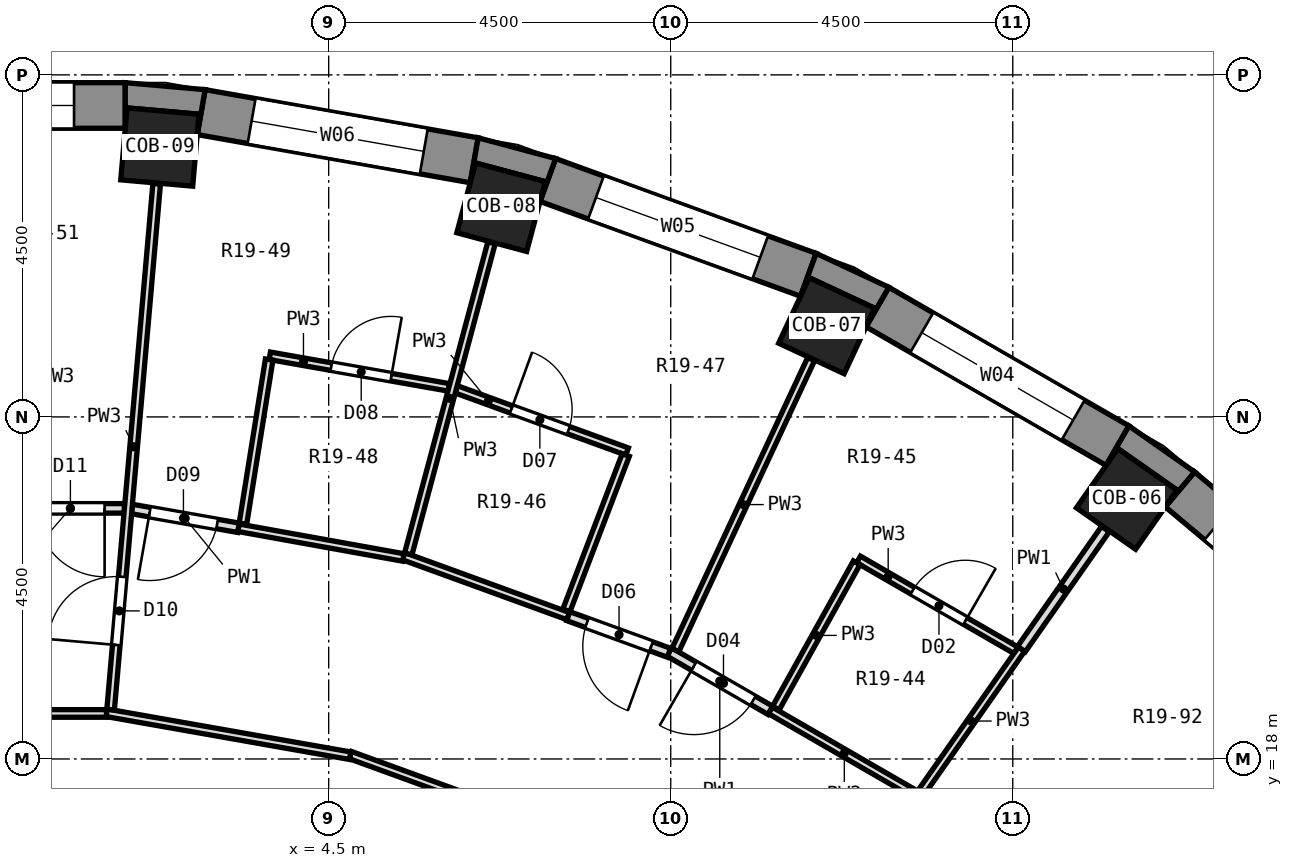
"""IFC4 building model, lengths in metres.
Left out: names, types, materials, properties, quantities, classifications, styles, units other than length and angle.
Written with IfcOpenShell. Run it as: python <this file> out.ifc"""

import sys

from ifc_helpers import new_model, si_unit, direction, frame, frame_2d, origin, origin_2d, place, context, subcontext, project, spatial, polyline, rectangle, outline, extrude, element, fill, save


model = new_model("IFC4")
c1 = context("Model", 3, precision=1e-05, world=origin(), true_north=direction((0.0, 1.0)))
c2 = subcontext(c1, "Body", "Model", "MODEL_VIEW")
j1 = project(units=[si_unit("LENGTHUNIT", "METRE"), si_unit("PLANEANGLEUNIT", "RADIAN")], contexts=[c1])
p1 = place(None, origin())
s1 = spatial("IfcSite", under=j1, at=p1, CompositionType="ELEMENT")
p2 = place(p1, origin())
s2 = spatial("IfcBuilding", under=s1, at=p2, CompositionType="ELEMENT")
p3 = place(p2, frame((0.0, 0.0, 111.7)))
s3 = spatial("IfcBuildingStorey", under=s2, at=p3, CompositionType="ELEMENT", Elevation=111.7)
for number, where, z_axis, x_axis in (
    (1, (14.999, 21.421, 0.0), (0.0, 0.0, 1.0), (0.574, 0.819, 0.0)),
    (2, (11.052, 23.7, 0.0), (0.0, 0.0, 1.0), (0.423, 0.906, 0.0)),
    (3, (6.768, 25.259, 0.0), (0.0, 0.0, 1.0), (0.259, 0.966, 0.0)),
    (4, (2.279, 26.051, 0.0), (0.0, 0.0, 1.0), (0.087, 0.996, 0.0)),
):
    element("IfcColumn", number, at=place(p3, frame(where, z_axis=z_axis, x_axis=x_axis)), inside=s3, PredefinedType="COLUMN", context=c2, shape_type="SweptSolid", body=[
        extrude(rectangle(XDim=0.95, YDim=0.95, at=origin_2d()), origin(), (0.0, 0.0, 1.0), 3.3),
    ])
p4 = place(p3, frame((18.494, 19.202, 0.0), z_axis=(0.0, 0.0, 1.0), x_axis=(-0.766055462616, 0.642774476932, 0.0)))
e5 = element("IfcWall", 5, at=p4, inside=s3, PredefinedType="SOLIDWALL", context=c2, shape_type="SweptSolid", body=[
    extrude(rectangle(XDim=3.648, YDim=0.6, at=frame_2d((1.824, 0.0))), origin(), (0.0, 0.0, 1.0), 2.8),
])
p5 = place(p4, frame((0.674, 0.0, 0.9)))
e6 = element("IfcOpeningElement", 6, at=p5, cuts=e5, PredefinedType="OPENING", context=c2, shape_type="SweptSolid", body=[
    extrude(rectangle(XDim=2.3, YDim=1.8, at=frame_2d((1.15, 0.9))), frame((0.0, 0.312, 0.0), z_axis=(0.0, -1.0, 0.0), x_axis=(1.0, 0.0, 0.0)), (0.0, 0.0, 1.0), 0.624),
])
p6 = place(p3, frame((14.878, 22.122, 0.0), z_axis=(0.0, 0.0, 1.0), x_axis=(-0.866051847062, 0.499954196102, 0.0)))
e7 = element("IfcWall", 7, at=p6, inside=s3, PredefinedType="SOLIDWALL", context=c2, shape_type="SweptSolid", body=[
    extrude(rectangle(XDim=3.648, YDim=0.6, at=frame_2d((1.824, 0.0))), origin(), (0.0, 0.0, 1.0), 2.8),
])
p7 = place(p6, frame((0.674, 0.0, 0.9)))
e8 = element("IfcOpeningElement", 8, at=p7, cuts=e7, PredefinedType="OPENING", context=c2, shape_type="SweptSolid", body=[
    extrude(rectangle(XDim=2.3, YDim=1.8, at=frame_2d((1.15, 0.9))), frame((0.0, 0.312, 0.0), z_axis=(0.0, -1.0, 0.0), x_axis=(1.0, 0.0, 0.0)), (0.0, 0.0, 1.0), 0.624),
])
p8 = place(p3, frame((10.811, 24.369, 0.0), z_axis=(0.0, 0.0, 1.0), x_axis=(-0.939703505393, 0.341990236633, 0.0)))
e9 = element("IfcWall", 9, at=p8, inside=s3, PredefinedType="SOLIDWALL", context=c2, shape_type="SweptSolid", body=[
    extrude(rectangle(XDim=3.648, YDim=0.6, at=frame_2d((1.824, 0.0))), origin(), (0.0, 0.0, 1.0), 2.8),
])
p9 = place(p8, frame((0.674, 0.0, 0.9)))
e10 = element("IfcOpeningElement", 10, at=p9, cuts=e9, PredefinedType="OPENING", context=c2, shape_type="SweptSolid", body=[
    extrude(rectangle(XDim=2.3, YDim=1.8, at=frame_2d((1.15, 0.9))), frame((0.0, 0.312, 0.0), z_axis=(0.0, -1.0, 0.0), x_axis=(1.0, 0.0, 0.0)), (0.0, 0.0, 1.0), 0.624),
])
p10 = place(p3, frame((6.415, 25.876, 0.0), z_axis=(0.0, 0.0, 1.0), x_axis=(-0.984803764455, 0.173670796382, 0.0)))
e11 = element("IfcWall", 11, at=p10, inside=s3, PredefinedType="SOLIDWALL", context=c2, shape_type="SweptSolid", body=[
    extrude(rectangle(XDim=3.648, YDim=0.6, at=frame_2d((1.824, 0.0))), origin(), (0.0, 0.0, 1.0), 2.8),
])
p11 = place(p10, frame((0.674, 0.0, 0.9)))
e12 = element("IfcOpeningElement", 12, at=p11, cuts=e11, PredefinedType="OPENING", context=c2, shape_type="SweptSolid", body=[
    extrude(rectangle(XDim=2.3, YDim=1.8, at=frame_2d((1.15, 0.9))), frame((0.0, 0.312, 0.0), z_axis=(0.0, -1.0, 0.0), x_axis=(1.0, 0.0, 0.0)), (0.0, 0.0, 1.0), 0.624),
])
p12 = place(p3, frame((1.824, 26.597, 0.0), z_axis=(0.0, 0.0, 1.0), x_axis=(-1.0, 0.0, 0.0)))
e13 = element("IfcWall", 13, at=p12, inside=s3, PredefinedType="SOLIDWALL", context=c2, shape_type="SweptSolid", body=[
    extrude(rectangle(XDim=3.648, YDim=0.6, at=frame_2d((1.824, 0.0))), origin(), (0.0, 0.0, 1.0), 2.8),
])
p13 = place(p12, frame((0.674, 0.0, 0.9)))
e14 = element("IfcOpeningElement", 14, at=p13, cuts=e13, PredefinedType="OPENING", context=c2, shape_type="SweptSolid", body=[
    extrude(rectangle(XDim=2.3, YDim=1.8, at=frame_2d((1.15, 0.9))), frame((0.0, 0.312, 0.0), z_axis=(0.0, -1.0, 0.0), x_axis=(1.0, 0.0, 0.0)), (0.0, 0.0, 1.0), 0.624),
])
p14 = place(p3, origin())
e15 = element("IfcWall", 15, at=p14, inside=s3, PredefinedType="SOLIDWALL", context=c2, shape_type="SweptSolid", body=[
    extrude(outline(polyline([(15.028, 22.382), (14.728, 21.862), (14.882, 22.083), (15.661, 21.538), (15.506, 21.317), (15.892, 21.777), (15.028, 22.382)])), origin(), (0.0, 0.0, 1.0), 2.8),
])
p15 = place(p3, origin())
e16 = element("IfcWall", 16, at=p15, inside=s3, PredefinedType="SOLIDWALL", context=c2, shape_type="SweptSolid", body=[
    extrude(outline(polyline([(10.913, 24.651), (10.708, 24.087), (10.822, 24.331), (11.683, 23.93), (11.569, 23.686), (11.869, 24.206), (10.913, 24.651)])), origin(), (0.0, 0.0, 1.0), 2.8),
])
p16 = place(p3, origin())
e17 = element("IfcWall", 17, at=p16, inside=s3, PredefinedType="SOLIDWALL", context=c2, shape_type="SweptSolid", body=[
    extrude(outline(polyline([(7.486, 25.899), (6.467, 26.172), (6.363, 25.581), (6.432, 25.841), (7.35, 25.595), (7.28, 25.335), (7.486, 25.899)])), origin(), (0.0, 0.0, 1.0), 2.8),
])
p17 = place(p3, origin())
e18 = element("IfcWall", 18, at=p17, inside=s3, PredefinedType="SOLIDWALL", context=c2, shape_type="SweptSolid", body=[
    extrude(outline(polyline([(2.875, 26.805), (1.824, 26.897), (1.824, 26.297), (1.847, 26.565), (2.794, 26.482), (2.77, 26.215), (2.875, 26.805)])), origin(), (0.0, 0.0, 1.0), 2.8),
])
p18 = place(p3, frame((10.31, 18.64, 0.0), z_axis=(0.0, 0.0, 1.0), x_axis=(0.865856719536, -0.500292055938, 0.0)))
e19 = element("IfcWall", 19, at=p18, inside=s3, PredefinedType="PARTITIONING", context=c2, shape_type="SweptSolid", body=[
    extrude(rectangle(XDim=2.251, YDim=0.1, at=frame_2d((1.125, 0.0))), origin(), (0.0, 0.0, 1.0), 2.8),
])
p19 = place(p3, frame((8.98, 19.408, 0.0), z_axis=(0.0, 0.0, 1.0), x_axis=(0.866013487713, -0.500020638674, 0.0)))
e20 = element("IfcWall", 20, at=p19, inside=s3, PredefinedType="PARTITIONING", context=c2, shape_type="SweptSolid", body=[
    extrude(rectangle(XDim=1.536, YDim=0.125, at=frame_2d((0.768, 0.0))), origin(), (0.0, 0.0, 1.0), 2.8),
])
p20 = place(p19, frame((0.375, 0.0, 0.0)))
e21 = element("IfcOpeningElement", 21, at=p20, cuts=e20, PredefinedType="OPENING", context=c2, shape_type="SweptSolid", body=[
    extrude(rectangle(XDim=0.9, YDim=2.1, at=frame_2d((0.45, 1.05))), frame((0.0, 0.074, 0.0), z_axis=(0.0, -1.0, 0.0), x_axis=(1.0, 0.0, 0.0)), (0.0, 0.0, 1.0), 0.149),
])
p21 = place(p3, frame((11.471, 20.625, 0.0), z_axis=(0.0, 0.0, 1.0), x_axis=(0.866161784063, -0.499763707994, 0.0)))
e22 = element("IfcWall", 22, at=p21, inside=s3, PredefinedType="PARTITIONING", context=c2, shape_type="SweptSolid", body=[
    extrude(rectangle(XDim=2.391, YDim=0.1, at=frame_2d((1.195, 0.0))), origin(), (0.0, 0.0, 1.0), 2.8),
])
p22 = place(p21, frame((0.822, 0.0, 0.0)))
e23 = element("IfcOpeningElement", 23, at=p22, cuts=e22, PredefinedType="OPENING", context=c2, shape_type="SweptSolid", body=[
    extrude(rectangle(XDim=0.8, YDim=2.1, at=frame_2d((0.4, 1.05))), frame((0.0, 0.062, 0.0), z_axis=(0.0, -1.0, 0.0), x_axis=(1.0, 0.0, 0.0)), (0.0, 0.0, 1.0), 0.124),
])
p23 = place(p3, frame((4.784, 18.051, 0.0), z_axis=(0.0, 0.0, 1.0), x_axis=(0.939697033511, -0.34200801922, 0.0)))
e24 = element("IfcWall", 24, at=p23, inside=s3, PredefinedType="PARTITIONING", context=c2, shape_type="SweptSolid", body=[
    extrude(rectangle(XDim=3.255, YDim=0.1, at=frame_2d((1.627, 0.0))), origin(), (0.0, 0.0, 1.0), 2.8),
])
p24 = place(p3, frame((5.485, 20.667, 0.0), z_axis=(0.0, 0.0, 1.0), x_axis=(0.939734670151, -0.34190459154, 0.0)))
e25 = element("IfcWall", 25, at=p24, inside=s3, PredefinedType="PARTITIONING", context=c2, shape_type="SweptSolid", body=[
    extrude(rectangle(XDim=2.306, YDim=0.1, at=frame_2d((1.153, 0.0))), origin(), (0.0, 0.0, 1.0), 2.8),
])
p25 = place(p3, frame((7.652, 19.879, 0.0), z_axis=(0.0, 0.0, 1.0), x_axis=(0.939813657692, -0.341687413896, 0.0)))
e26 = element("IfcWall", 26, at=p25, inside=s3, PredefinedType="PARTITIONING", context=c2, shape_type="SweptSolid", body=[
    extrude(rectangle(XDim=1.409, YDim=0.125, at=frame_2d((0.705, 0.0))), origin(), (0.0, 0.0, 1.0), 2.8),
])
p26 = place(p25, frame((0.261, 0.0, 0.0)))
e27 = element("IfcOpeningElement", 27, at=p26, cuts=e26, PredefinedType="OPENING", context=c2, shape_type="SweptSolid", body=[
    extrude(rectangle(XDim=0.9, YDim=2.1, at=frame_2d((0.45, 1.05))), frame((0.0, 0.074, 0.0), z_axis=(0.0, -1.0, 0.0), x_axis=(1.0, 0.0, 0.0)), (0.0, 0.0, 1.0), 0.149),
])
p27 = place(p3, frame((6.178, 22.863, 0.0), z_axis=(0.0, 0.0, 1.0), x_axis=(0.93973977618, -0.341890557146, 0.0)))
e28 = element("IfcWall", 28, at=p27, inside=s3, PredefinedType="PARTITIONING", context=c2, shape_type="SweptSolid", body=[
    extrude(rectangle(XDim=2.392, YDim=0.1, at=frame_2d((1.196, 0.0))), origin(), (0.0, 0.0, 1.0), 2.8),
])
p28 = place(p27, frame((0.771, 0.0, 0.0)))
e29 = element("IfcOpeningElement", 29, at=p28, cuts=e28, PredefinedType="OPENING", context=c2, shape_type="SweptSolid", body=[
    extrude(rectangle(XDim=0.8, YDim=2.1, at=frame_2d((0.4, 1.05))), frame((0.0, 0.062, 0.0), z_axis=(0.0, -1.0, 0.0), x_axis=(1.0, 0.0, 0.0)), (0.0, 0.0, 1.0), 0.124),
])
p29 = place(p3, frame((3.313, 21.042, 0.0), z_axis=(0.0, 0.0, 1.0), x_axis=(0.984157440959, -0.17729673264, 0.0)))
e30 = element("IfcWall", 30, at=p29, inside=s3, PredefinedType="PARTITIONING", context=c2, shape_type="SweptSolid", body=[
    extrude(rectangle(XDim=2.205, YDim=0.1, at=frame_2d((1.102, 0.0))), origin(), (0.0, 0.0, 1.0), 2.8),
])
p30 = place(p3, frame((1.577, 18.608, 0.0), z_axis=(0.0, 0.0, 1.0), x_axis=(0.984812236301, -0.173622749755, 0.0)))
e31 = element("IfcWall", 31, at=p30, inside=s3, PredefinedType="PARTITIONING", context=c2, shape_type="SweptSolid", body=[
    extrude(rectangle(XDim=3.255, YDim=0.1, at=frame_2d((1.628, 0.0))), origin(), (0.0, 0.0, 1.0), 2.8),
])
p31 = place(p3, frame((1.912, 21.288, 0.0), z_axis=(0.0, 0.0, 1.0), x_axis=(0.984849170905, -0.173413121097, 0.0)))
e32 = element("IfcWall", 32, at=p31, inside=s3, PredefinedType="PARTITIONING", context=c2, shape_type="SweptSolid", body=[
    extrude(rectangle(XDim=1.422, YDim=0.125, at=frame_2d((0.711, 0.0))), origin(), (0.0, 0.0, 1.0), 2.8),
])
p32 = place(p31, frame((0.237, 0.0, 0.0)))
e33 = element("IfcOpeningElement", 33, at=p32, cuts=e32, PredefinedType="OPENING", context=c2, shape_type="SweptSolid", body=[
    extrude(rectangle(XDim=0.9, YDim=2.1, at=frame_2d((0.45, 1.05))), frame((0.0, 0.074, 0.0), z_axis=(0.0, -1.0, 0.0), x_axis=(1.0, 0.0, 0.0)), (0.0, 0.0, 1.0), 0.149),
])
p33 = place(p3, frame((3.725, 23.304, 0.0), z_axis=(0.0, 0.0, 1.0), x_axis=(0.984826665662, -0.173540884522, 0.0)))
e34 = element("IfcWall", 34, at=p33, inside=s3, PredefinedType="PARTITIONING", context=c2, shape_type="SweptSolid", body=[
    extrude(rectangle(XDim=2.393, YDim=0.1, at=frame_2d((1.197, 0.0))), origin(), (0.0, 0.0, 1.0), 2.8),
])
p34 = place(p33, frame((0.822, 0.0, 0.0)))
e35 = element("IfcOpeningElement", 35, at=p34, cuts=e34, PredefinedType="OPENING", context=c2, shape_type="SweptSolid", body=[
    extrude(rectangle(XDim=0.8, YDim=2.1, at=frame_2d((0.4, 1.05))), frame((0.0, 0.062, 0.0), z_axis=(0.0, -1.0, 0.0), x_axis=(1.0, 0.0, 0.0)), (0.0, 0.0, 1.0), 0.124),
])
p35 = place(p3, frame((-1.678, 18.599, 0.0), z_axis=(0.0, 0.0, 1.0), x_axis=(1.0, 0.0, 0.0)))
e36 = element("IfcWall", 36, at=p35, inside=s3, PredefinedType="PARTITIONING", context=c2, shape_type="SweptSolid", body=[
    extrude(rectangle(XDim=3.255, YDim=0.1, at=frame_2d((1.627, 0.0))), origin(), (0.0, 0.0, 1.0), 2.8),
])
p36 = place(p3, frame((0.391, 21.297, 0.0), z_axis=(0.0, 0.0, 1.0), x_axis=(1.0, 0.0, 0.0)))
e37 = element("IfcWall", 37, at=p36, inside=s3, PredefinedType="PARTITIONING", context=c2, shape_type="SweptSolid", body=[
    extrude(rectangle(XDim=1.422, YDim=0.125, at=frame_2d((0.711, 0.0))), origin(), (0.0, 0.0, 1.0), 2.8),
])
p37 = place(p36, frame((0.261, 0.0, 0.0)))
e38 = element("IfcOpeningElement", 38, at=p37, cuts=e37, PredefinedType="OPENING", context=c2, shape_type="SweptSolid", body=[
    extrude(rectangle(XDim=0.9, YDim=2.1, at=frame_2d((0.45, 1.05))), frame((0.0, 0.074, 0.0), z_axis=(0.0, -1.0, 0.0), x_axis=(1.0, 0.0, 0.0)), (0.0, 0.0, 1.0), 0.149),
])
p38 = place(p3, frame((13.237, 13.237, 0.0), z_axis=(0.0, 0.0, 1.0), x_axis=(0.707106781187, 0.707106781187, 0.0)))
e39 = element("IfcWall", 39, at=p38, inside=s3, PredefinedType="PARTITIONING", context=c2, shape_type="SweptSolid", body=[
    extrude(rectangle(XDim=6.945, YDim=0.1, at=frame_2d((3.472, 0.0))), origin(), (0.0, 0.0, 1.0), 2.8),
])
p39 = place(p38, frame((3.364, 0.0, 0.0)))
e40 = element("IfcOpeningElement", 40, at=p39, cuts=e39, PredefinedType="OPENING", context=c2, shape_type="SweptSolid", body=[
    extrude(rectangle(XDim=0.9, YDim=2.1, at=frame_2d((0.45, 1.05))), frame((0.0, 0.062, 0.0), z_axis=(0.0, -1.0, 0.0), x_axis=(1.0, 0.0, 0.0)), (0.0, 0.0, 1.0), 0.124),
])
p40 = place(p3, frame((12.291, 17.553, 0.0), z_axis=(0.0, 0.0, 1.0), x_axis=(0.573582946976, 0.819147485462, 0.0)))
e41 = element("IfcWall", 41, at=p40, inside=s3, PredefinedType="PARTITIONING", context=c2, shape_type="SweptSolid", body=[
    extrude(rectangle(XDim=2.31, YDim=0.1, at=frame_2d((1.155, 0.0))), origin(), (0.0, 0.0, 1.0), 2.8),
])
p41 = place(p3, frame((13.614, 19.446, 0.0), z_axis=(0.0, 0.0, 1.0), x_axis=(0.573470846205, 0.819225969164, 0.0)))
e42 = element("IfcWall", 42, at=p41, inside=s3, PredefinedType="PARTITIONING", context=c2, shape_type="SweptSolid", body=[
    extrude(rectangle(XDim=1.927, YDim=0.125, at=frame_2d((0.964, 0.0))), origin(), (0.0, 0.0, 1.0), 2.8),
])
p42 = place(p3, frame((10.383, 18.67, 0.0), z_axis=(0.0, 0.0, 1.0), x_axis=(0.486154549708, 0.873872847615, 0.0)))
e43 = element("IfcWall", 43, at=p42, inside=s3, PredefinedType="PARTITIONING", context=c2, shape_type="SweptSolid", body=[
    extrude(rectangle(XDim=2.188, YDim=0.1, at=frame_2d((1.094, 0.0))), origin(), (0.0, 0.0, 1.0), 2.8),
])
p43 = place(p3, frame((9.062, 19.433, 0.0), z_axis=(0.0, 0.0, 1.0), x_axis=(0.422606972268, 0.906313051319, 0.0)))
e44 = element("IfcWall", 44, at=p43, inside=s3, PredefinedType="PARTITIONING", context=c2, shape_type="SweptSolid", body=[
    extrude(rectangle(XDim=4.224, YDim=0.1, at=frame_2d((2.112, 0.0))), origin(), (0.0, 0.0, 1.0), 2.8),
])
p44 = place(p3, frame((7.627, 19.954, 0.0), z_axis=(0.0, 0.0, 1.0), x_axis=(0.356937039246, 0.934128444067, 0.0)))
e45 = element("IfcWall", 45, at=p44, inside=s3, PredefinedType="PARTITIONING", context=c2, shape_type="SweptSolid", body=[
    extrude(rectangle(XDim=2.188, YDim=0.1, at=frame_2d((1.094, 0.0))), origin(), (0.0, 0.0, 1.0), 2.8),
])
p45 = place(p3, frame((5.547, 20.698, 0.0), z_axis=(0.0, 0.0, 1.0), x_axis=(0.258516199654, 0.966006922603, 0.0)))
e46 = element("IfcWall", 46, at=p45, inside=s3, PredefinedType="PARTITIONING", context=c2, shape_type="SweptSolid", body=[
    extrude(rectangle(XDim=4.237, YDim=0.1, at=frame_2d((2.118, 0.0))), origin(), (0.0, 0.0, 1.0), 2.8),
])
p46 = place(p3, frame((3.372, 21.095, 0.0), z_axis=(0.0, 0.0, 1.0), x_axis=(0.157825077305, 0.987467085514, 0.0)))
e47 = element("IfcWall", 47, at=p46, inside=s3, PredefinedType="PARTITIONING", context=c2, shape_type="SweptSolid", body=[
    extrude(rectangle(XDim=2.187, YDim=0.1, at=frame_2d((1.094, 0.0))), origin(), (0.0, 0.0, 1.0), 2.8),
])
p47 = place(p3, frame((1.631, 18.649, 0.0), z_axis=(0.0, 0.0, 1.0), x_axis=(0.087251550035, 0.996186311398, 0.0)))
e48 = element("IfcWall", 48, at=p47, inside=s3, PredefinedType="PARTITIONING", context=c2, shape_type="SweptSolid", body=[
    extrude(rectangle(XDim=6.945, YDim=0.1, at=frame_2d((3.472, 0.0))), origin(), (0.0, 0.0, 1.0), 2.8),
])
p48 = place(p47, frame((0.854, 0.0, 0.0)))
e49 = element("IfcOpeningElement", 49, at=p48, cuts=e48, PredefinedType="OPENING", context=c2, shape_type="SweptSolid", body=[
    extrude(rectangle(XDim=0.9, YDim=2.1, at=frame_2d((0.45, 1.05))), frame((0.0, 0.062, 0.0), z_axis=(0.0, -1.0, 0.0), x_axis=(1.0, 0.0, 0.0)), (0.0, 0.0, 1.0), 0.124),
])
p49 = place(p5, origin())
e50 = element("IfcWindow", 50, at=p49, inside=s3, PartitioningType="SINGLE_PANEL", PredefinedType="WINDOW", context=c2, shape_type="SweptSolid", body=[
    extrude(rectangle(XDim=2.3, YDim=1.8, at=frame_2d((1.15, 0.9))), frame((0.0, 0.18, 0.0), z_axis=(0.0, -1.0, 0.0), x_axis=(1.0, 0.0, 0.0)), (0.0, 0.0, 1.0), 0.06),
])
fill(e6, e50)
p50 = place(p7, origin())
e51 = element("IfcWindow", 51, at=p50, inside=s3, PartitioningType="SINGLE_PANEL", PredefinedType="WINDOW", context=c2, shape_type="SweptSolid", body=[
    extrude(rectangle(XDim=2.3, YDim=1.8, at=frame_2d((1.15, 0.9))), frame((0.0, 0.18, 0.0), z_axis=(0.0, -1.0, 0.0), x_axis=(1.0, 0.0, 0.0)), (0.0, 0.0, 1.0), 0.06),
])
fill(e8, e51)
p51 = place(p9, origin())
e52 = element("IfcWindow", 52, at=p51, inside=s3, PartitioningType="SINGLE_PANEL", PredefinedType="WINDOW", context=c2, shape_type="SweptSolid", body=[
    extrude(rectangle(XDim=2.3, YDim=1.8, at=frame_2d((1.15, 0.9))), frame((0.0, 0.18, 0.0), z_axis=(0.0, -1.0, 0.0), x_axis=(1.0, 0.0, 0.0)), (0.0, 0.0, 1.0), 0.06),
])
fill(e10, e52)
p52 = place(p11, origin())
e53 = element("IfcWindow", 53, at=p52, inside=s3, PartitioningType="SINGLE_PANEL", PredefinedType="WINDOW", context=c2, shape_type="SweptSolid", body=[
    extrude(rectangle(XDim=2.3, YDim=1.8, at=frame_2d((1.15, 0.9))), frame((0.0, 0.18, 0.0), z_axis=(0.0, -1.0, 0.0), x_axis=(1.0, 0.0, 0.0)), (0.0, 0.0, 1.0), 0.06),
])
fill(e12, e53)
p53 = place(p13, origin())
e54 = element("IfcWindow", 54, at=p53, inside=s3, PartitioningType="SINGLE_PANEL", PredefinedType="WINDOW", context=c2, shape_type="SweptSolid", body=[
    extrude(rectangle(XDim=2.3, YDim=1.8, at=frame_2d((1.15, 0.9))), frame((0.0, 0.18, 0.0), z_axis=(0.0, -1.0, 0.0), x_axis=(1.0, 0.0, 0.0)), (0.0, 0.0, 1.0), 0.06),
])
fill(e14, e54)
p54 = place(p22, origin())
e55 = element("IfcDoor", 55, at=p54, inside=s3, OperationType="SINGLE_SWING_RIGHT", PredefinedType="DOOR", context=c2, shape_type="SweptSolid", body=[
    extrude(rectangle(XDim=0.8, YDim=2.1, at=frame_2d((0.4, 1.05))), frame((0.0, 0.025, 0.0), z_axis=(0.0, -1.0, 0.0), x_axis=(1.0, 0.0, 0.0)), (0.0, 0.0, 1.0), 0.05),
])
fill(e23, e55)
p55 = place(p20, frame((0.9, 0.0, 0.0), z_axis=(0.0, 0.0, 1.0), x_axis=(-1.0, 0.0, 0.0)))
e56 = element("IfcDoor", 56, at=p55, inside=s3, OperationType="SINGLE_SWING_RIGHT", PredefinedType="DOOR", context=c2, shape_type="SweptSolid", body=[
    extrude(rectangle(XDim=0.9, YDim=2.1, at=frame_2d((0.45, 1.05))), frame((0.0, 0.025, 0.0), z_axis=(0.0, -1.0, 0.0), x_axis=(1.0, 0.0, 0.0)), (0.0, 0.0, 1.0), 0.05),
])
fill(e21, e56)
p56 = place(p26, frame((0.9, 0.0, 0.0), z_axis=(0.0, 0.0, 1.0), x_axis=(-1.0, 0.0, 0.0)))
e57 = element("IfcDoor", 57, at=p56, inside=s3, OperationType="SINGLE_SWING_LEFT", PredefinedType="DOOR", context=c2, shape_type="SweptSolid", body=[
    extrude(rectangle(XDim=0.9, YDim=2.1, at=frame_2d((0.45, 1.05))), frame((0.0, 0.025, 0.0), z_axis=(0.0, -1.0, 0.0), x_axis=(1.0, 0.0, 0.0)), (0.0, 0.0, 1.0), 0.05),
])
fill(e27, e57)
p57 = place(p28, origin())
e58 = element("IfcDoor", 58, at=p57, inside=s3, OperationType="SINGLE_SWING_LEFT", PredefinedType="DOOR", context=c2, shape_type="SweptSolid", body=[
    extrude(rectangle(XDim=0.8, YDim=2.1, at=frame_2d((0.4, 1.05))), frame((0.0, 0.025, 0.0), z_axis=(0.0, -1.0, 0.0), x_axis=(1.0, 0.0, 0.0)), (0.0, 0.0, 1.0), 0.05),
])
fill(e29, e58)
p58 = place(p34, origin())
e59 = element("IfcDoor", 59, at=p58, inside=s3, OperationType="SINGLE_SWING_RIGHT", PredefinedType="DOOR", context=c2, shape_type="SweptSolid", body=[
    extrude(rectangle(XDim=0.8, YDim=2.1, at=frame_2d((0.4, 1.05))), frame((0.0, 0.025, 0.0), z_axis=(0.0, -1.0, 0.0), x_axis=(1.0, 0.0, 0.0)), (0.0, 0.0, 1.0), 0.05),
])
fill(e35, e59)
p59 = place(p32, frame((0.9, 0.0, 0.0), z_axis=(0.0, 0.0, 1.0), x_axis=(-1.0, 0.0, 0.0)))
e60 = element("IfcDoor", 60, at=p59, inside=s3, OperationType="SINGLE_SWING_RIGHT", PredefinedType="DOOR", context=c2, shape_type="SweptSolid", body=[
    extrude(rectangle(XDim=0.9, YDim=2.1, at=frame_2d((0.45, 1.05))), frame((0.0, 0.025, 0.0), z_axis=(0.0, -1.0, 0.0), x_axis=(1.0, 0.0, 0.0)), (0.0, 0.0, 1.0), 0.05),
])
fill(e33, e60)
p60 = place(p48, origin())
e61 = element("IfcDoor", 61, at=p60, inside=s3, OperationType="SINGLE_SWING_LEFT", PredefinedType="DOOR", context=c2, shape_type="SweptSolid", body=[
    extrude(rectangle(XDim=0.9, YDim=2.1, at=frame_2d((0.45, 1.05))), frame((0.0, 0.025, 0.0), z_axis=(0.0, -1.0, 0.0), x_axis=(1.0, 0.0, 0.0)), (0.0, 0.0, 1.0), 0.05),
])
fill(e49, e61)
p61 = place(p37, frame((0.9, 0.0, 0.0), z_axis=(0.0, 0.0, 1.0), x_axis=(-1.0, 0.0, 0.0)))
e62 = element("IfcDoor", 62, at=p61, inside=s3, OperationType="SINGLE_SWING_LEFT", PredefinedType="DOOR", context=c2, shape_type="SweptSolid", body=[
    extrude(rectangle(XDim=0.9, YDim=2.1, at=frame_2d((0.45, 1.05))), frame((0.0, 0.025, 0.0), z_axis=(0.0, -1.0, 0.0), x_axis=(1.0, 0.0, 0.0)), (0.0, 0.0, 1.0), 0.05),
])
fill(e38, e62)
save(model, sys.argv[1])
